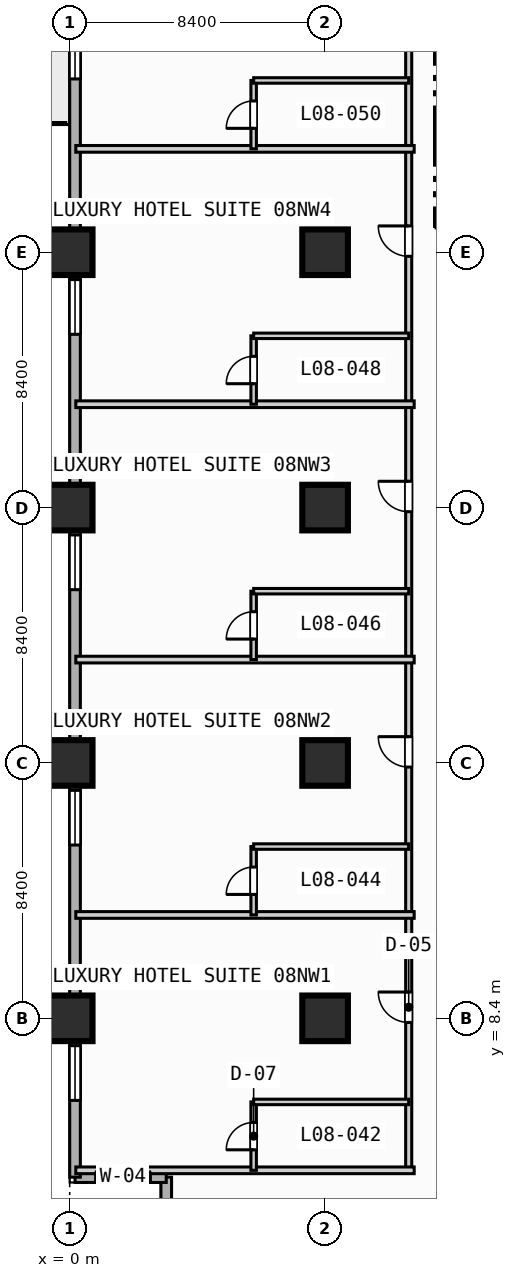
"""IFC4 building model, lengths in metres.
Left out: names, types, materials, properties, quantities, classifications, styles, units other than length and angle.
Written with IfcOpenShell. Run it as: python <this file> out.ifc"""

import sys

from ifc_helpers import new_model, si_unit, direction, frame, frame_2d, origin, origin_2d, place, context, subcontext, project, spatial, rectangle, extrude, element, fill, save


model = new_model("IFC4")
c1 = context("Model", 3, precision=1e-05, world=origin(), true_north=direction((0.0, 1.0)))
c2 = subcontext(c1, "Body", "Model", "MODEL_VIEW")
j1 = project(units=[si_unit("LENGTHUNIT", "METRE"), si_unit("PLANEANGLEUNIT", "RADIAN")], contexts=[c1])
p1 = place(None, origin())
s1 = spatial("IfcSite", under=j1, at=p1, CompositionType="ELEMENT")
p2 = place(p1, origin())
s2 = spatial("IfcBuilding", under=s1, at=p2, CompositionType="ELEMENT")
p3 = place(p2, frame((0.0, 0.0, 39.6)))
s3 = spatial("IfcBuildingStorey", under=s2, at=p3, CompositionType="ELEMENT", Elevation=39.6)
for number, where, z_axis, x_axis in (
    (1, (0.0, 8.4, 0.0), (0.0, 0.0, 1.0), (1.0, 0.0, 0.0)),
    (2, (0.0, 16.8, 0.0), (0.0, 0.0, 1.0), (1.0, 0.0, 0.0)),
    (3, (0.0, 25.2, 0.0), (0.0, 0.0, 1.0), (1.0, 0.0, 0.0)),
    (4, (0.0, 33.6, 0.0), (0.0, 0.0, 1.0), (1.0, 0.0, 0.0)),
    (5, (8.4, 8.4, 0.0), (0.0, 0.0, 1.0), (1.0, 0.0, 0.0)),
    (6, (8.4, 16.8, 0.0), (0.0, 0.0, 1.0), (1.0, 0.0, 0.0)),
    (7, (8.4, 25.2, 0.0), (0.0, 0.0, 1.0), (1.0, 0.0, 0.0)),
    (8, (8.4, 33.6, 0.0), (0.0, 0.0, 1.0), (1.0, 0.0, 0.0)),
):
    element("IfcColumn", number, at=place(p3, frame(where, z_axis=z_axis, x_axis=x_axis)), inside=s3, PredefinedType="COLUMN", context=c2, shape_type="SweptSolid", body=[
        extrude(rectangle(XDim=1.5, YDim=1.5, at=origin_2d()), origin(), (0.0, 0.0, 1.0), 3.8),
    ])
p4 = place(p3, frame((3.175, 0.175, 0.0), z_axis=(0.0, 0.0, 1.0), x_axis=(0.0, 1.0, 0.0)))
e9 = element("IfcWall", 9, at=p4, inside=s3, PredefinedType="STANDARD", context=c2, shape_type="SweptSolid", body=[
    extrude(rectangle(XDim=3.0, YDim=0.35, at=frame_2d((1.5, 0.0))), origin(), (0.0, 0.0, 1.0), 3.55),
])
p5 = place(p3, frame((3.175, 3.175, 0.0), z_axis=(0.0, 0.0, 1.0), x_axis=(-1.0, 0.0, 0.0)))
e10 = element("IfcWall", 10, at=p5, inside=s3, PredefinedType="STANDARD", context=c2, shape_type="SweptSolid", body=[
    extrude(rectangle(XDim=3.0, YDim=0.35, at=frame_2d((1.5, 0.0))), origin(), (0.0, 0.0, 1.0), 3.55),
])
p6 = place(p5, frame((0.522, 0.0, 0.85)))
e11 = element("IfcOpeningElement", 11, at=p6, cuts=e10, PredefinedType="OPENING", context=c2, shape_type="SweptSolid", body=[
    extrude(rectangle(XDim=1.8, YDim=1.8, at=frame_2d((0.9, 0.9))), frame((0.0, 0.185, 0.0), z_axis=(0.0, -1.0, 0.0), x_axis=(1.0, 0.0, 0.0)), (0.0, 0.0, 1.0), 0.37),
])
p7 = place(p3, frame((0.175, 3.175, 0.0), z_axis=(0.0, 0.0, 1.0), x_axis=(0.0, 1.0, 0.0)))
e12 = element("IfcWall", 12, at=p7, inside=s3, PredefinedType="STANDARD", context=c2, shape_type="SweptSolid", body=[
    extrude(rectangle(XDim=86.05, YDim=0.35, at=frame_2d((43.025, 0.0))), origin(), (0.0, 0.0, 1.0), 3.55),
])
p8 = place(p7, frame((42.825, 0.0, 0.0)))
e13 = element("IfcOpeningElement", 13, at=p8, cuts=e12, PredefinedType="OPENING", context=c2, shape_type="SweptSolid", body=[
    extrude(rectangle(XDim=1.4, YDim=2.2, at=frame_2d((0.7, 1.1))), frame((0.0, 0.185, 0.0), z_axis=(0.0, -1.0, 0.0), x_axis=(1.0, 0.0, 0.0)), (0.0, 0.0, 1.0), 0.37),
])
p9 = place(p7, frame((2.525, 0.0, 0.85)))
e14 = element("IfcOpeningElement", 14, at=p9, cuts=e12, PredefinedType="OPENING", context=c2, shape_type="SweptSolid", body=[
    extrude(rectangle(XDim=1.8, YDim=1.8, at=frame_2d((0.9, 0.9))), frame((0.0, 0.185, 0.0), z_axis=(0.0, -1.0, 0.0), x_axis=(1.0, 0.0, 0.0)), (0.0, 0.0, 1.0), 0.37),
])
p10 = place(p7, frame((10.925, 0.0, 0.85)))
e15 = element("IfcOpeningElement", 15, at=p10, cuts=e12, PredefinedType="OPENING", context=c2, shape_type="SweptSolid", body=[
    extrude(rectangle(XDim=1.8, YDim=1.8, at=frame_2d((0.9, 0.9))), frame((0.0, 0.185, 0.0), z_axis=(0.0, -1.0, 0.0), x_axis=(1.0, 0.0, 0.0)), (0.0, 0.0, 1.0), 0.37),
])
p11 = place(p7, frame((19.325, 0.0, 0.85)))
e16 = element("IfcOpeningElement", 16, at=p11, cuts=e12, PredefinedType="OPENING", context=c2, shape_type="SweptSolid", body=[
    extrude(rectangle(XDim=1.8, YDim=1.8, at=frame_2d((0.9, 0.9))), frame((0.0, 0.185, 0.0), z_axis=(0.0, -1.0, 0.0), x_axis=(1.0, 0.0, 0.0)), (0.0, 0.0, 1.0), 0.37),
])
p12 = place(p7, frame((27.725, 0.0, 0.85)))
e17 = element("IfcOpeningElement", 17, at=p12, cuts=e12, PredefinedType="OPENING", context=c2, shape_type="SweptSolid", body=[
    extrude(rectangle(XDim=1.8, YDim=1.8, at=frame_2d((0.9, 0.9))), frame((0.0, 0.185, 0.0), z_axis=(0.0, -1.0, 0.0), x_axis=(1.0, 0.0, 0.0)), (0.0, 0.0, 1.0), 0.37),
])
p13 = place(p7, frame((36.125, 0.0, 0.85)))
e18 = element("IfcOpeningElement", 18, at=p13, cuts=e12, PredefinedType="OPENING", context=c2, shape_type="SweptSolid", body=[
    extrude(rectangle(XDim=1.8, YDim=1.8, at=frame_2d((0.9, 0.9))), frame((0.0, 0.185, 0.0), z_axis=(0.0, -1.0, 0.0), x_axis=(1.0, 0.0, 0.0)), (0.0, 0.0, 1.0), 0.37),
])
p14 = place(p7, frame((52.925, 0.0, 0.85)))
e19 = element("IfcOpeningElement", 19, at=p14, cuts=e12, PredefinedType="OPENING", context=c2, shape_type="SweptSolid", body=[
    extrude(rectangle(XDim=1.8, YDim=1.8, at=frame_2d((0.9, 0.9))), frame((0.0, 0.185, 0.0), z_axis=(0.0, -1.0, 0.0), x_axis=(1.0, 0.0, 0.0)), (0.0, 0.0, 1.0), 0.37),
])
p15 = place(p7, frame((61.325, 0.0, 0.85)))
e20 = element("IfcOpeningElement", 20, at=p15, cuts=e12, PredefinedType="OPENING", context=c2, shape_type="SweptSolid", body=[
    extrude(rectangle(XDim=1.8, YDim=1.8, at=frame_2d((0.9, 0.9))), frame((0.0, 0.185, 0.0), z_axis=(0.0, -1.0, 0.0), x_axis=(1.0, 0.0, 0.0)), (0.0, 0.0, 1.0), 0.37),
])
p16 = place(p7, frame((69.725, 0.0, 0.85)))
e21 = element("IfcOpeningElement", 21, at=p16, cuts=e12, PredefinedType="OPENING", context=c2, shape_type="SweptSolid", body=[
    extrude(rectangle(XDim=1.8, YDim=1.8, at=frame_2d((0.9, 0.9))), frame((0.0, 0.185, 0.0), z_axis=(0.0, -1.0, 0.0), x_axis=(1.0, 0.0, 0.0)), (0.0, 0.0, 1.0), 0.37),
])
p17 = place(p7, frame((78.075, 0.0, 0.85)))
e22 = element("IfcOpeningElement", 22, at=p17, cuts=e12, PredefinedType="OPENING", context=c2, shape_type="SweptSolid", body=[
    extrude(rectangle(XDim=1.8, YDim=1.8, at=frame_2d((0.9, 0.9))), frame((0.0, 0.185, 0.0), z_axis=(0.0, -1.0, 0.0), x_axis=(1.0, 0.0, 0.0)), (0.0, 0.0, 1.0), 0.37),
])
p18 = place(p3, frame((11.15, 3.4, 0.0), z_axis=(0.0, 0.0, 1.0), x_axis=(0.0, 1.0, 0.0)))
e23 = element("IfcWall", 23, at=p18, inside=s3, PredefinedType="PARTITIONING", context=c2, shape_type="SweptSolid", body=[
    extrude(rectangle(XDim=85.4, YDim=0.2, at=frame_2d((42.7, 0.0))), origin(), (0.0, 0.0, 1.0), 3.55),
])
p19 = place(p18, frame((4.865, 0.0, 0.0)))
e24 = element("IfcOpeningElement", 24, at=p19, cuts=e23, PredefinedType="OPENING", context=c2, shape_type="SweptSolid", body=[
    extrude(rectangle(XDim=1.0, YDim=2.15, at=frame_2d((0.5, 1.075))), frame((0.0, 0.11, 0.0), z_axis=(0.0, -1.0, 0.0), x_axis=(1.0, 0.0, 0.0)), (0.0, 0.0, 1.0), 0.22),
])
p20 = place(p18, frame((13.265, 0.0, 0.0)))
e25 = element("IfcOpeningElement", 25, at=p20, cuts=e23, PredefinedType="OPENING", context=c2, shape_type="SweptSolid", body=[
    extrude(rectangle(XDim=1.0, YDim=2.15, at=frame_2d((0.5, 1.075))), frame((0.0, 0.11, 0.0), z_axis=(0.0, -1.0, 0.0), x_axis=(1.0, 0.0, 0.0)), (0.0, 0.0, 1.0), 0.22),
])
p21 = place(p18, frame((21.665, 0.0, 0.0)))
e26 = element("IfcOpeningElement", 26, at=p21, cuts=e23, PredefinedType="OPENING", context=c2, shape_type="SweptSolid", body=[
    extrude(rectangle(XDim=1.0, YDim=2.15, at=frame_2d((0.5, 1.075))), frame((0.0, 0.11, 0.0), z_axis=(0.0, -1.0, 0.0), x_axis=(1.0, 0.0, 0.0)), (0.0, 0.0, 1.0), 0.22),
])
p22 = place(p18, frame((30.065, 0.0, 0.0)))
e27 = element("IfcOpeningElement", 27, at=p22, cuts=e23, PredefinedType="OPENING", context=c2, shape_type="SweptSolid", body=[
    extrude(rectangle(XDim=1.0, YDim=2.15, at=frame_2d((0.5, 1.075))), frame((0.0, 0.11, 0.0), z_axis=(0.0, -1.0, 0.0), x_axis=(1.0, 0.0, 0.0)), (0.0, 0.0, 1.0), 0.22),
])
p23 = place(p18, frame((38.465, 0.0, 0.0)))
e28 = element("IfcOpeningElement", 28, at=p23, cuts=e23, PredefinedType="OPENING", context=c2, shape_type="SweptSolid", body=[
    extrude(rectangle(XDim=1.0, YDim=2.15, at=frame_2d((0.5, 1.075))), frame((0.0, 0.11, 0.0), z_axis=(0.0, -1.0, 0.0), x_axis=(1.0, 0.0, 0.0)), (0.0, 0.0, 1.0), 0.22),
])
p24 = place(p18, frame((46.865, 0.0, 0.0)))
e29 = element("IfcOpeningElement", 29, at=p24, cuts=e23, PredefinedType="OPENING", context=c2, shape_type="SweptSolid", body=[
    extrude(rectangle(XDim=1.0, YDim=2.15, at=frame_2d((0.5, 1.075))), frame((0.0, 0.11, 0.0), z_axis=(0.0, -1.0, 0.0), x_axis=(1.0, 0.0, 0.0)), (0.0, 0.0, 1.0), 0.22),
])
p25 = place(p18, frame((55.265, 0.0, 0.0)))
e30 = element("IfcOpeningElement", 30, at=p25, cuts=e23, PredefinedType="OPENING", context=c2, shape_type="SweptSolid", body=[
    extrude(rectangle(XDim=1.0, YDim=2.15, at=frame_2d((0.5, 1.075))), frame((0.0, 0.11, 0.0), z_axis=(0.0, -1.0, 0.0), x_axis=(1.0, 0.0, 0.0)), (0.0, 0.0, 1.0), 0.22),
])
p26 = place(p18, frame((63.665, 0.0, 0.0)))
e31 = element("IfcOpeningElement", 31, at=p26, cuts=e23, PredefinedType="OPENING", context=c2, shape_type="SweptSolid", body=[
    extrude(rectangle(XDim=1.0, YDim=2.15, at=frame_2d((0.5, 1.075))), frame((0.0, 0.11, 0.0), z_axis=(0.0, -1.0, 0.0), x_axis=(1.0, 0.0, 0.0)), (0.0, 0.0, 1.0), 0.22),
])
p27 = place(p18, frame((72.065, 0.0, 0.0)))
e32 = element("IfcOpeningElement", 32, at=p27, cuts=e23, PredefinedType="OPENING", context=c2, shape_type="SweptSolid", body=[
    extrude(rectangle(XDim=1.0, YDim=2.15, at=frame_2d((0.5, 1.075))), frame((0.0, 0.11, 0.0), z_axis=(0.0, -1.0, 0.0), x_axis=(1.0, 0.0, 0.0)), (0.0, 0.0, 1.0), 0.22),
])
p28 = place(p18, frame((81.165, 0.0, 0.0)))
e33 = element("IfcOpeningElement", 33, at=p28, cuts=e23, PredefinedType="OPENING", context=c2, shape_type="SweptSolid", body=[
    extrude(rectangle(XDim=1.0, YDim=2.15, at=frame_2d((0.5, 1.075))), frame((0.0, 0.11, 0.0), z_axis=(0.0, -1.0, 0.0), x_axis=(1.0, 0.0, 0.0)), (0.0, 0.0, 1.0), 0.22),
])
p29 = place(p3, frame((0.2, 3.4, 0.0), z_axis=(0.0, 0.0, 1.0), x_axis=(1.0, 0.0, 0.0)))
e34 = element("IfcWall", 34, at=p29, inside=s3, PredefinedType="PARTITIONING", context=c2, shape_type="SweptSolid", body=[
    extrude(rectangle(XDim=11.13, YDim=0.22, at=frame_2d((5.565, 0.0))), origin(), (0.0, 0.0, 1.0), 3.55),
])
p30 = place(p3, frame((6.05, 3.4, 0.0), z_axis=(0.0, 0.0, 1.0), x_axis=(0.0, 1.0, 0.0)))
e35 = element("IfcWall", 35, at=p30, inside=s3, PredefinedType="PLUMBINGWALL", context=c2, shape_type="SweptSolid", body=[
    extrude(rectangle(XDim=2.25, YDim=0.18, at=frame_2d((1.125, 0.0))), origin(), (0.0, 0.0, 1.0), 3.55),
])
p31 = place(p30, frame((0.675, 0.0, 0.0)))
e36 = element("IfcOpeningElement", 36, at=p31, cuts=e35, PredefinedType="OPENING", context=c2, shape_type="SweptSolid", body=[
    extrude(rectangle(XDim=0.9, YDim=2.1, at=frame_2d((0.45, 1.05))), frame((0.0, 0.1, 0.0), z_axis=(0.0, -1.0, 0.0), x_axis=(1.0, 0.0, 0.0)), (0.0, 0.0, 1.0), 0.2),
])
p32 = place(p3, frame((6.05, 5.65, 0.0), z_axis=(0.0, 0.0, 1.0), x_axis=(1.0, 0.0, 0.0)))
e37 = element("IfcWall", 37, at=p32, inside=s3, PredefinedType="PLUMBINGWALL", context=c2, shape_type="SweptSolid", body=[
    extrude(rectangle(XDim=5.1, YDim=0.18, at=frame_2d((2.55, 0.0))), origin(), (0.0, 0.0, 1.0), 3.55),
])
p33 = place(p3, frame((0.2, 11.8, 0.0), z_axis=(0.0, 0.0, 1.0), x_axis=(1.0, 0.0, 0.0)))
e38 = element("IfcWall", 38, at=p33, inside=s3, PredefinedType="PARTITIONING", context=c2, shape_type="SweptSolid", body=[
    extrude(rectangle(XDim=11.13, YDim=0.22, at=frame_2d((5.565, 0.0))), origin(), (0.0, 0.0, 1.0), 3.55),
])
p34 = place(p3, frame((6.05, 11.8, 0.0), z_axis=(0.0, 0.0, 1.0), x_axis=(0.0, 1.0, 0.0)))
e39 = element("IfcWall", 39, at=p34, inside=s3, PredefinedType="PLUMBINGWALL", context=c2, shape_type="SweptSolid", body=[
    extrude(rectangle(XDim=2.25, YDim=0.18, at=frame_2d((1.125, 0.0))), origin(), (0.0, 0.0, 1.0), 3.55),
])
p35 = place(p34, frame((0.675, 0.0, 0.0)))
e40 = element("IfcOpeningElement", 40, at=p35, cuts=e39, PredefinedType="OPENING", context=c2, shape_type="SweptSolid", body=[
    extrude(rectangle(XDim=0.9, YDim=2.1, at=frame_2d((0.45, 1.05))), frame((0.0, 0.1, 0.0), z_axis=(0.0, -1.0, 0.0), x_axis=(1.0, 0.0, 0.0)), (0.0, 0.0, 1.0), 0.2),
])
p36 = place(p3, frame((6.05, 14.05, 0.0), z_axis=(0.0, 0.0, 1.0), x_axis=(1.0, 0.0, 0.0)))
e41 = element("IfcWall", 41, at=p36, inside=s3, PredefinedType="PLUMBINGWALL", context=c2, shape_type="SweptSolid", body=[
    extrude(rectangle(XDim=5.1, YDim=0.18, at=frame_2d((2.55, 0.0))), origin(), (0.0, 0.0, 1.0), 3.55),
])
p37 = place(p3, frame((0.2, 20.2, 0.0), z_axis=(0.0, 0.0, 1.0), x_axis=(1.0, 0.0, 0.0)))
e42 = element("IfcWall", 42, at=p37, inside=s3, PredefinedType="PARTITIONING", context=c2, shape_type="SweptSolid", body=[
    extrude(rectangle(XDim=11.13, YDim=0.22, at=frame_2d((5.565, 0.0))), origin(), (0.0, 0.0, 1.0), 3.55),
])
p38 = place(p3, frame((6.05, 20.2, 0.0), z_axis=(0.0, 0.0, 1.0), x_axis=(0.0, 1.0, 0.0)))
e43 = element("IfcWall", 43, at=p38, inside=s3, PredefinedType="PLUMBINGWALL", context=c2, shape_type="SweptSolid", body=[
    extrude(rectangle(XDim=2.25, YDim=0.18, at=frame_2d((1.125, 0.0))), origin(), (0.0, 0.0, 1.0), 3.55),
])
p39 = place(p38, frame((0.675, 0.0, 0.0)))
e44 = element("IfcOpeningElement", 44, at=p39, cuts=e43, PredefinedType="OPENING", context=c2, shape_type="SweptSolid", body=[
    extrude(rectangle(XDim=0.9, YDim=2.1, at=frame_2d((0.45, 1.05))), frame((0.0, 0.1, 0.0), z_axis=(0.0, -1.0, 0.0), x_axis=(1.0, 0.0, 0.0)), (0.0, 0.0, 1.0), 0.2),
])
p40 = place(p3, frame((6.05, 22.45, 0.0), z_axis=(0.0, 0.0, 1.0), x_axis=(1.0, 0.0, 0.0)))
e45 = element("IfcWall", 45, at=p40, inside=s3, PredefinedType="PLUMBINGWALL", context=c2, shape_type="SweptSolid", body=[
    extrude(rectangle(XDim=5.1, YDim=0.18, at=frame_2d((2.55, 0.0))), origin(), (0.0, 0.0, 1.0), 3.55),
])
p41 = place(p3, frame((0.2, 28.6, 0.0), z_axis=(0.0, 0.0, 1.0), x_axis=(1.0, 0.0, 0.0)))
e46 = element("IfcWall", 46, at=p41, inside=s3, PredefinedType="PARTITIONING", context=c2, shape_type="SweptSolid", body=[
    extrude(rectangle(XDim=11.13, YDim=0.22, at=frame_2d((5.565, 0.0))), origin(), (0.0, 0.0, 1.0), 3.55),
])
p42 = place(p3, frame((6.05, 28.6, 0.0), z_axis=(0.0, 0.0, 1.0), x_axis=(0.0, 1.0, 0.0)))
e47 = element("IfcWall", 47, at=p42, inside=s3, PredefinedType="PLUMBINGWALL", context=c2, shape_type="SweptSolid", body=[
    extrude(rectangle(XDim=2.25, YDim=0.18, at=frame_2d((1.125, 0.0))), origin(), (0.0, 0.0, 1.0), 3.55),
])
p43 = place(p42, frame((0.675, 0.0, 0.0)))
e48 = element("IfcOpeningElement", 48, at=p43, cuts=e47, PredefinedType="OPENING", context=c2, shape_type="SweptSolid", body=[
    extrude(rectangle(XDim=0.9, YDim=2.1, at=frame_2d((0.45, 1.05))), frame((0.0, 0.1, 0.0), z_axis=(0.0, -1.0, 0.0), x_axis=(1.0, 0.0, 0.0)), (0.0, 0.0, 1.0), 0.2),
])
p44 = place(p3, frame((6.05, 30.85, 0.0), z_axis=(0.0, 0.0, 1.0), x_axis=(1.0, 0.0, 0.0)))
e49 = element("IfcWall", 49, at=p44, inside=s3, PredefinedType="PLUMBINGWALL", context=c2, shape_type="SweptSolid", body=[
    extrude(rectangle(XDim=5.1, YDim=0.18, at=frame_2d((2.55, 0.0))), origin(), (0.0, 0.0, 1.0), 3.55),
])
p45 = place(p3, frame((0.2, 37.0, 0.0), z_axis=(0.0, 0.0, 1.0), x_axis=(1.0, 0.0, 0.0)))
e50 = element("IfcWall", 50, at=p45, inside=s3, PredefinedType="PARTITIONING", context=c2, shape_type="SweptSolid", body=[
    extrude(rectangle(XDim=11.13, YDim=0.22, at=frame_2d((5.565, 0.0))), origin(), (0.0, 0.0, 1.0), 3.55),
])
p46 = place(p3, frame((6.05, 37.0, 0.0), z_axis=(0.0, 0.0, 1.0), x_axis=(0.0, 1.0, 0.0)))
e51 = element("IfcWall", 51, at=p46, inside=s3, PredefinedType="PLUMBINGWALL", context=c2, shape_type="SweptSolid", body=[
    extrude(rectangle(XDim=2.25, YDim=0.18, at=frame_2d((1.125, 0.0))), origin(), (0.0, 0.0, 1.0), 3.55),
])
p47 = place(p46, frame((0.675, 0.0, 0.0)))
e52 = element("IfcOpeningElement", 52, at=p47, cuts=e51, PredefinedType="OPENING", context=c2, shape_type="SweptSolid", body=[
    extrude(rectangle(XDim=0.9, YDim=2.1, at=frame_2d((0.45, 1.05))), frame((0.0, 0.1, 0.0), z_axis=(0.0, -1.0, 0.0), x_axis=(1.0, 0.0, 0.0)), (0.0, 0.0, 1.0), 0.2),
])
p48 = place(p3, frame((6.05, 39.25, 0.0), z_axis=(0.0, 0.0, 1.0), x_axis=(1.0, 0.0, 0.0)))
e53 = element("IfcWall", 53, at=p48, inside=s3, PredefinedType="PLUMBINGWALL", context=c2, shape_type="SweptSolid", body=[
    extrude(rectangle(XDim=5.1, YDim=0.18, at=frame_2d((2.55, 0.0))), origin(), (0.0, 0.0, 1.0), 3.55),
])
p49 = place(p6, origin())
e54 = element("IfcWindow", 54, at=p49, inside=s3, PartitioningType="SINGLE_PANEL", PredefinedType="WINDOW", context=c2, shape_type="SweptSolid", body=[
    extrude(rectangle(XDim=1.8, YDim=1.8, at=frame_2d((0.9, 0.9))), frame((0.0, 0.03, 0.0), z_axis=(0.0, -1.0, 0.0), x_axis=(1.0, 0.0, 0.0)), (0.0, 0.0, 1.0), 0.06),
])
fill(e11, e54)
p50 = place(p9, origin())
e55 = element("IfcWindow", 55, at=p50, inside=s3, PartitioningType="SINGLE_PANEL", PredefinedType="WINDOW", context=c2, shape_type="SweptSolid", body=[
    extrude(rectangle(XDim=1.8, YDim=1.8, at=frame_2d((0.9, 0.9))), frame((0.0, 0.03, 0.0), z_axis=(0.0, -1.0, 0.0), x_axis=(1.0, 0.0, 0.0)), (0.0, 0.0, 1.0), 0.06),
])
fill(e14, e55)
p51 = place(p10, origin())
e56 = element("IfcWindow", 56, at=p51, inside=s3, PartitioningType="SINGLE_PANEL", PredefinedType="WINDOW", context=c2, shape_type="SweptSolid", body=[
    extrude(rectangle(XDim=1.8, YDim=1.8, at=frame_2d((0.9, 0.9))), frame((0.0, 0.03, 0.0), z_axis=(0.0, -1.0, 0.0), x_axis=(1.0, 0.0, 0.0)), (0.0, 0.0, 1.0), 0.06),
])
fill(e15, e56)
p52 = place(p11, origin())
e57 = element("IfcWindow", 57, at=p52, inside=s3, PartitioningType="SINGLE_PANEL", PredefinedType="WINDOW", context=c2, shape_type="SweptSolid", body=[
    extrude(rectangle(XDim=1.8, YDim=1.8, at=frame_2d((0.9, 0.9))), frame((0.0, 0.03, 0.0), z_axis=(0.0, -1.0, 0.0), x_axis=(1.0, 0.0, 0.0)), (0.0, 0.0, 1.0), 0.06),
])
fill(e16, e57)
p53 = place(p12, origin())
e58 = element("IfcWindow", 58, at=p53, inside=s3, PartitioningType="SINGLE_PANEL", PredefinedType="WINDOW", context=c2, shape_type="SweptSolid", body=[
    extrude(rectangle(XDim=1.8, YDim=1.8, at=frame_2d((0.9, 0.9))), frame((0.0, 0.03, 0.0), z_axis=(0.0, -1.0, 0.0), x_axis=(1.0, 0.0, 0.0)), (0.0, 0.0, 1.0), 0.06),
])
fill(e17, e58)
p54 = place(p13, origin())
e59 = element("IfcWindow", 59, at=p54, inside=s3, PartitioningType="SINGLE_PANEL", PredefinedType="WINDOW", context=c2, shape_type="SweptSolid", body=[
    extrude(rectangle(XDim=1.8, YDim=1.8, at=frame_2d((0.9, 0.9))), frame((0.0, 0.03, 0.0), z_axis=(0.0, -1.0, 0.0), x_axis=(1.0, 0.0, 0.0)), (0.0, 0.0, 1.0), 0.06),
])
fill(e18, e59)
p55 = place(p19, origin())
e60 = element("IfcDoor", 60, at=p55, inside=s3, OperationType="SINGLE_SWING_RIGHT", PredefinedType="DOOR", context=c2, shape_type="SweptSolid", body=[
    extrude(rectangle(XDim=1.0, YDim=2.15, at=frame_2d((0.5, 1.075))), frame((0.0, 0.025, 0.0), z_axis=(0.0, -1.0, 0.0), x_axis=(1.0, 0.0, 0.0)), (0.0, 0.0, 1.0), 0.05),
])
fill(e24, e60)
p56 = place(p20, origin())
e61 = element("IfcDoor", 61, at=p56, inside=s3, OperationType="SINGLE_SWING_RIGHT", PredefinedType="DOOR", context=c2, shape_type="SweptSolid", body=[
    extrude(rectangle(XDim=1.0, YDim=2.15, at=frame_2d((0.5, 1.075))), frame((0.0, 0.025, 0.0), z_axis=(0.0, -1.0, 0.0), x_axis=(1.0, 0.0, 0.0)), (0.0, 0.0, 1.0), 0.05),
])
fill(e25, e61)
p57 = place(p21, origin())
e62 = element("IfcDoor", 62, at=p57, inside=s3, OperationType="SINGLE_SWING_RIGHT", PredefinedType="DOOR", context=c2, shape_type="SweptSolid", body=[
    extrude(rectangle(XDim=1.0, YDim=2.15, at=frame_2d((0.5, 1.075))), frame((0.0, 0.025, 0.0), z_axis=(0.0, -1.0, 0.0), x_axis=(1.0, 0.0, 0.0)), (0.0, 0.0, 1.0), 0.05),
])
fill(e26, e62)
p58 = place(p22, origin())
e63 = element("IfcDoor", 63, at=p58, inside=s3, OperationType="SINGLE_SWING_RIGHT", PredefinedType="DOOR", context=c2, shape_type="SweptSolid", body=[
    extrude(rectangle(XDim=1.0, YDim=2.15, at=frame_2d((0.5, 1.075))), frame((0.0, 0.025, 0.0), z_axis=(0.0, -1.0, 0.0), x_axis=(1.0, 0.0, 0.0)), (0.0, 0.0, 1.0), 0.05),
])
fill(e27, e63)
p59 = place(p31, origin())
e64 = element("IfcDoor", 64, at=p59, inside=s3, OperationType="SINGLE_SWING_LEFT", PredefinedType="DOOR", context=c2, shape_type="SweptSolid", body=[
    extrude(rectangle(XDim=0.9, YDim=2.1, at=frame_2d((0.45, 1.05))), frame((0.0, 0.025, 0.0), z_axis=(0.0, -1.0, 0.0), x_axis=(1.0, 0.0, 0.0)), (0.0, 0.0, 1.0), 0.05),
])
fill(e36, e64)
p60 = place(p35, origin())
e65 = element("IfcDoor", 65, at=p60, inside=s3, OperationType="SINGLE_SWING_LEFT", PredefinedType="DOOR", context=c2, shape_type="SweptSolid", body=[
    extrude(rectangle(XDim=0.9, YDim=2.1, at=frame_2d((0.45, 1.05))), frame((0.0, 0.025, 0.0), z_axis=(0.0, -1.0, 0.0), x_axis=(1.0, 0.0, 0.0)), (0.0, 0.0, 1.0), 0.05),
])
fill(e40, e65)
p61 = place(p39, origin())
e66 = element("IfcDoor", 66, at=p61, inside=s3, OperationType="SINGLE_SWING_LEFT", PredefinedType="DOOR", context=c2, shape_type="SweptSolid", body=[
    extrude(rectangle(XDim=0.9, YDim=2.1, at=frame_2d((0.45, 1.05))), frame((0.0, 0.025, 0.0), z_axis=(0.0, -1.0, 0.0), x_axis=(1.0, 0.0, 0.0)), (0.0, 0.0, 1.0), 0.05),
])
fill(e44, e66)
p62 = place(p43, origin())
e67 = element("IfcDoor", 67, at=p62, inside=s3, OperationType="SINGLE_SWING_LEFT", PredefinedType="DOOR", context=c2, shape_type="SweptSolid", body=[
    extrude(rectangle(XDim=0.9, YDim=2.1, at=frame_2d((0.45, 1.05))), frame((0.0, 0.025, 0.0), z_axis=(0.0, -1.0, 0.0), x_axis=(1.0, 0.0, 0.0)), (0.0, 0.0, 1.0), 0.05),
])
fill(e48, e67)
p63 = place(p47, origin())
e68 = element("IfcDoor", 68, at=p63, inside=s3, OperationType="SINGLE_SWING_LEFT", PredefinedType="DOOR", context=c2, shape_type="SweptSolid", body=[
    extrude(rectangle(XDim=0.9, YDim=2.1, at=frame_2d((0.45, 1.05))), frame((0.0, 0.025, 0.0), z_axis=(0.0, -1.0, 0.0), x_axis=(1.0, 0.0, 0.0)), (0.0, 0.0, 1.0), 0.05),
])
fill(e52, e68)
save(model, sys.argv[1])
